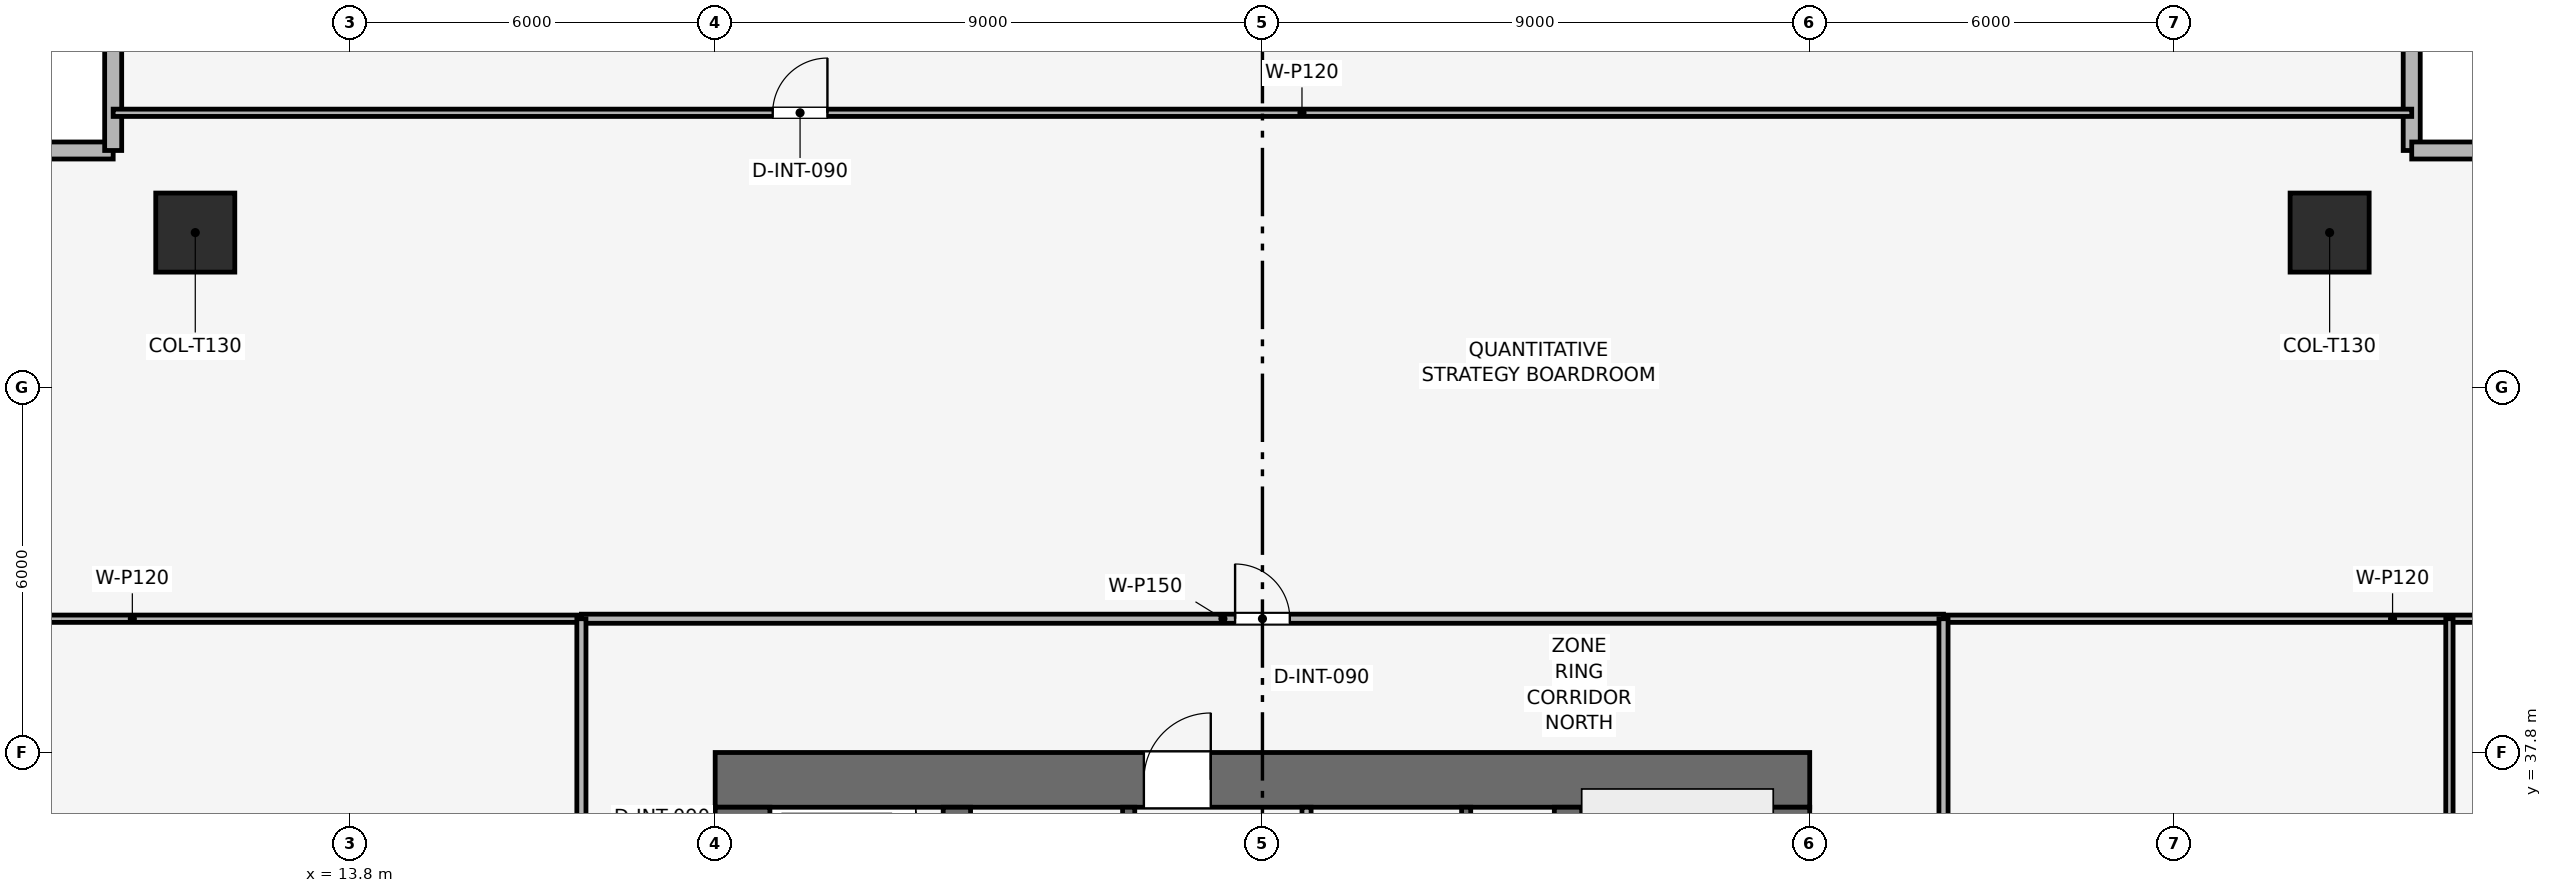
"""IFC4 building model, lengths in metres.
Left out: names, types, materials, properties, quantities, classifications, styles, units other than length and angle.
Written with IfcOpenShell. Run it as: python <this file> out.ifc"""

import sys

from ifc_helpers import new_model, si_unit, direction, frame, frame_2d, origin, origin_2d, place, context, subcontext, project, spatial, rectangle, extrude, element, fill, save


model = new_model("IFC4")
c1 = context("Model", 3, precision=1e-05, world=origin(), true_north=direction((0.0, 1.0)))
c2 = subcontext(c1, "Body", "Model", "MODEL_VIEW")
j1 = project(units=[si_unit("LENGTHUNIT", "METRE"), si_unit("PLANEANGLEUNIT", "RADIAN")], contexts=[c1])
p1 = place(None, origin())
s1 = spatial("IfcSite", under=j1, at=p1, CompositionType="ELEMENT")
p2 = place(p1, origin())
s2 = spatial("IfcBuilding", under=s1, at=p2, CompositionType="ELEMENT")
p3 = place(p2, frame((0.0, 0.0, 121.2)))
s3 = spatial("IfcBuildingStorey", under=s2, at=p3, CompositionType="ELEMENT", Elevation=121.2)
p4 = place(p3, frame((19.8, 37.35, 0.0), z_axis=(0.0, 0.0, 1.0), x_axis=(1.0, 0.0, 0.0)))
e1 = element("IfcWall", 1, at=p4, inside=s3, PredefinedType="SHEAR", context=c2, shape_type="SweptSolid", body=[
    extrude(rectangle(XDim=18.0, YDim=0.9, at=frame_2d((9.0, 0.0))), origin(), (0.0, 0.0, 1.0), 3.9),
])
p5 = place(p4, frame((7.05, 0.0, 0.0)))
e2 = element("IfcOpeningElement", 2, at=p5, cuts=e1, PredefinedType="OPENING", context=c2, shape_type="SweptSolid", body=[
    extrude(rectangle(XDim=1.1, YDim=2.15, at=frame_2d((0.55, 1.075))), frame((0.0, 0.46, 0.0), z_axis=(0.0, -1.0, 0.0), x_axis=(1.0, 0.0, 0.0)), (0.0, 0.0, 1.0), 0.92),
])
p6 = place(p3, frame((20.25, 20.7, 0.0), z_axis=(0.0, 0.0, 1.0), x_axis=(0.0, 1.0, 0.0)))
e3 = element("IfcWall", 3, at=p6, inside=s3, PredefinedType="SHEAR", context=c2, shape_type="SweptSolid", body=[
    extrude(rectangle(XDim=16.2, YDim=0.9, at=frame_2d((8.1, 0.0))), origin(), (0.0, 0.0, 1.0), 3.9),
])
p7 = place(p6, frame((10.1, 0.0, 0.0)))
e4 = element("IfcOpeningElement", 4, at=p7, cuts=e3, PredefinedType="OPENING", context=c2, shape_type="SweptSolid", body=[
    extrude(rectangle(XDim=1.1, YDim=2.15, at=frame_2d((0.55, 1.075))), frame((0.0, 0.46, 0.0), z_axis=(0.0, -1.0, 0.0), x_axis=(1.0, 0.0, 0.0)), (0.0, 0.0, 1.0), 0.92),
])
p8 = place(p3, frame((37.35, 20.7, 0.0), z_axis=(0.0, 0.0, 1.0), x_axis=(0.0, 1.0, 0.0)))
e5 = element("IfcWall", 5, at=p8, inside=s3, PredefinedType="SHEAR", context=c2, shape_type="SweptSolid", body=[
    extrude(rectangle(XDim=16.2, YDim=0.9, at=frame_2d((8.1, 0.0))), origin(), (0.0, 0.0, 1.0), 3.9),
])
p9 = place(p8, frame((4.6, 0.0, 0.0)))
e6 = element("IfcOpeningElement", 6, at=p9, cuts=e5, PredefinedType="OPENING", context=c2, shape_type="SweptSolid", body=[
    extrude(rectangle(XDim=1.1, YDim=2.15, at=frame_2d((0.55, 1.075))), frame((0.0, 0.46, 0.0), z_axis=(0.0, -1.0, 0.0), x_axis=(1.0, 0.0, 0.0)), (0.0, 0.0, 1.0), 0.92),
])
for number, where, z_axis, x_axis in (
    (7, (23.775, 20.7, 0.0), (0.0, 0.0, 1.0), (0.0, 1.0, 0.0)),
    (8, (33.825, 20.7, 0.0), (0.0, 0.0, 1.0), (0.0, 1.0, 0.0)),
):
    element("IfcWall", number, at=place(p3, frame(where, z_axis=z_axis, x_axis=x_axis)), inside=s3, PredefinedType="SHEAR", context=c2, shape_type="SweptSolid", body=[
        extrude(rectangle(XDim=16.2, YDim=0.45, at=frame_2d((8.1, 0.0))), origin(), (0.0, 0.0, 1.0), 3.9),
    ])
for number, where, z_axis, x_axis in (
    (9, (46.35, 46.35, 0.003), (0.0, 0.0, 1.0), (1.0, 0.0, 0.0)),
    (10, (11.25, 46.35, 0.003), (0.0, 0.0, 1.0), (1.0, 0.0, 0.0)),
):
    element("IfcColumn", number, at=place(p3, frame(where, z_axis=z_axis, x_axis=x_axis)), inside=s3, PredefinedType="COLUMN", context=c2, shape_type="SweptSolid", body=[
        extrude(rectangle(XDim=1.3, YDim=1.3, at=origin_2d()), origin(), (0.0, 0.0, 1.0), 3.644),
    ])
p10 = place(p3, frame((2.83, 47.7, 0.0), z_axis=(0.0, 0.0, 1.0), x_axis=(1.0, 0.0, 0.0)))
e11 = element("IfcWall", 11, at=p10, inside=s3, PredefinedType="SOLIDWALL", context=c2, shape_type="SweptSolid", body=[
    extrude(rectangle(XDim=7.07, YDim=0.28, at=frame_2d((3.535, 0.0))), origin(), (0.0, 0.0, 1.0), 3.65),
])
p11 = place(p10, frame((2.285, 0.0, 0.9)))
e12 = element("IfcOpeningElement", 12, at=p11, cuts=e11, PredefinedType="OPENING", context=c2, shape_type="SweptSolid", body=[
    extrude(rectangle(XDim=2.5, YDim=1.9, at=frame_2d((1.25, 0.95))), frame((0.0, 0.15, 0.0), z_axis=(0.0, -1.0, 0.0), x_axis=(1.0, 0.0, 0.0)), (0.0, 0.0, 1.0), 0.3),
])
p12 = place(p3, frame((9.9, 47.7, 0.0), z_axis=(0.0, 0.0, 1.0), x_axis=(0.0, 1.0, 0.0)))
e13 = element("IfcWall", 13, at=p12, inside=s3, PredefinedType="SOLIDWALL", context=c2, shape_type="SweptSolid", body=[
    extrude(rectangle(XDim=7.07, YDim=0.28, at=frame_2d((3.535, 0.0))), origin(), (0.0, 0.0, 1.0), 3.65),
])
p13 = place(p12, frame((2.285, 0.0, 0.9)))
e14 = element("IfcOpeningElement", 14, at=p13, cuts=e13, PredefinedType="OPENING", context=c2, shape_type="SweptSolid", body=[
    extrude(rectangle(XDim=2.5, YDim=1.9, at=frame_2d((1.25, 0.95))), frame((0.0, 0.15, 0.0), z_axis=(0.0, -1.0, 0.0), x_axis=(1.0, 0.0, 0.0)), (0.0, 0.0, 1.0), 0.3),
])
p14 = place(p3, frame((47.7, 54.77, 0.0), z_axis=(0.0, 0.0, 1.0), x_axis=(0.0, -1.0, 0.0)))
e15 = element("IfcWall", 15, at=p14, inside=s3, PredefinedType="SOLIDWALL", context=c2, shape_type="SweptSolid", body=[
    extrude(rectangle(XDim=7.07, YDim=0.28, at=frame_2d((3.535, 0.0))), origin(), (0.0, 0.0, 1.0), 3.65),
])
p15 = place(p14, frame((2.285, 0.0, 0.9)))
e16 = element("IfcOpeningElement", 16, at=p15, cuts=e15, PredefinedType="OPENING", context=c2, shape_type="SweptSolid", body=[
    extrude(rectangle(XDim=2.5, YDim=1.9, at=frame_2d((1.25, 0.95))), frame((0.0, 0.15, 0.0), z_axis=(0.0, -1.0, 0.0), x_axis=(1.0, 0.0, 0.0)), (0.0, 0.0, 1.0), 0.3),
])
p16 = place(p3, frame((47.7, 47.7, 0.0), z_axis=(0.0, 0.0, 1.0), x_axis=(1.0, 0.0, 0.0)))
e17 = element("IfcWall", 17, at=p16, inside=s3, PredefinedType="SOLIDWALL", context=c2, shape_type="SweptSolid", body=[
    extrude(rectangle(XDim=7.07, YDim=0.28, at=frame_2d((3.535, 0.0))), origin(), (0.0, 0.0, 1.0), 3.65),
])
p17 = place(p16, frame((2.285, 0.0, 0.9)))
e18 = element("IfcOpeningElement", 18, at=p17, cuts=e17, PredefinedType="OPENING", context=c2, shape_type="SweptSolid", body=[
    extrude(rectangle(XDim=2.5, YDim=1.9, at=frame_2d((1.25, 0.95))), frame((0.0, 0.15, 0.0), z_axis=(0.0, -1.0, 0.0), x_axis=(1.0, 0.0, 0.0)), (0.0, 0.0, 1.0), 0.3),
])
p18 = place(p3, frame((32.15, 34.0, 0.0), z_axis=(0.0, 0.0, 1.0), x_axis=(0.0, 1.0, 0.0)))
e19 = element("IfcWall", 19, at=p18, inside=s3, PredefinedType="SHEAR", context=c2, shape_type="SweptSolid", body=[
    extrude(rectangle(XDim=2.9, YDim=0.15, at=frame_2d((1.45, 0.0))), origin(), (0.0, 0.0, 1.0), 3.65),
])
p19 = place(p3, frame((26.6, 34.0, 0.0), z_axis=(0.0, 0.0, 1.0), x_axis=(0.0, 1.0, 0.0)))
e20 = element("IfcWall", 20, at=p19, inside=s3, PredefinedType="SHEAR", context=c2, shape_type="SweptSolid", body=[
    extrude(rectangle(XDim=2.9, YDim=0.2, at=frame_2d((1.45, 0.0))), origin(), (0.0, 0.0, 1.0), 3.65),
])
p20 = place(p19, frame((0.75, 0.0, 0.0)))
e21 = element("IfcOpeningElement", 21, at=p20, cuts=e20, PredefinedType="OPENING", context=c2, shape_type="SweptSolid", body=[
    extrude(rectangle(XDim=1.1, YDim=2.15, at=frame_2d((0.55, 1.075))), frame((0.0, 0.11, 0.0), z_axis=(0.0, -1.0, 0.0), x_axis=(1.0, 0.0, 0.0)), (0.0, 0.0, 1.0), 0.22),
])
p21 = place(p3, frame((29.525, 33.925, 0.0), z_axis=(0.0, 0.0, 1.0), x_axis=(0.0, 1.0, 0.0)))
e22 = element("IfcWall", 22, at=p21, inside=s3, PredefinedType="PARTITIONING", context=c2, shape_type="SweptSolid", body=[
    extrude(rectangle(XDim=2.975, YDim=0.15, at=frame_2d((1.487, 0.0))), origin(), (0.0, 0.0, 1.0), 3.65),
])
p22 = place(p21, frame((0.85, 0.0, 0.0)))
e23 = element("IfcOpeningElement", 23, at=p22, cuts=e22, PredefinedType="OPENING", context=c2, shape_type="SweptSolid", body=[
    extrude(rectangle(XDim=0.9, YDim=2.1, at=frame_2d((0.45, 1.05))), frame((0.0, 0.085, 0.0), z_axis=(0.0, -1.0, 0.0), x_axis=(1.0, 0.0, 0.0)), (0.0, 0.0, 1.0), 0.17),
])
p23 = place(p3, frame((9.9, 48.32, 0.0), z_axis=(0.0, 0.0, 1.0), x_axis=(1.0, 0.0, 0.0)))
e24 = element("IfcWall", 24, at=p23, inside=s3, PredefinedType="PARTITIONING", context=c2, shape_type="SweptSolid", body=[
    extrude(rectangle(XDim=37.8, YDim=0.12, at=frame_2d((18.9, 0.0))), origin(), (0.0, 0.0, 1.0), 3.035),
])
p24 = place(p23, frame((10.846, 0.0, 0.0)))
e25 = element("IfcOpeningElement", 25, at=p24, cuts=e24, PredefinedType="OPENING", context=c2, shape_type="SweptSolid", body=[
    extrude(rectangle(XDim=0.9, YDim=2.1, at=frame_2d((0.45, 1.05))), frame((0.0, 0.07, 0.0), z_axis=(0.0, -1.0, 0.0), x_axis=(1.0, 0.0, 0.0)), (0.0, 0.0, 1.0), 0.14),
])
for number, where, z_axis, x_axis in (
    (26, (2.83, 40.0, 0.0), (0.0, 0.0, 1.0), (1.0, 0.0, 0.0)),
    (27, (40.0, 40.0, 0.0), (0.0, 0.0, 1.0), (1.0, 0.0, 0.0)),
):
    element("IfcWall", number, at=place(p3, frame(where, z_axis=z_axis, x_axis=x_axis)), inside=s3, PredefinedType="PARTITIONING", context=c2, shape_type="SweptSolid", body=[
        extrude(rectangle(XDim=14.77, YDim=0.12, at=frame_2d((7.385, 0.0))), origin(), (0.0, 0.0, 1.0), 3.035),
    ])
p25 = place(p3, frame((48.32, 28.956, 0.0), z_axis=(0.0, 0.0, 1.0), x_axis=(0.0, 1.0, 0.0)))
e28 = element("IfcWall", 28, at=p25, inside=s3, PredefinedType="PARTITIONING", context=c2, shape_type="SweptSolid", body=[
    extrude(rectangle(XDim=11.044, YDim=0.12, at=frame_2d((5.522, 0.0))), origin(), (0.0, 0.0, 1.0), 3.185),
])
p26 = place(p25, frame((6.29, 0.0, 0.0)))
e29 = element("IfcOpeningElement", 29, at=p26, cuts=e28, PredefinedType="OPENING", context=c2, shape_type="SweptSolid", body=[
    extrude(rectangle(XDim=0.9, YDim=2.1, at=frame_2d((0.45, 1.05))), frame((0.0, 0.07, 0.0), z_axis=(0.0, -1.0, 0.0), x_axis=(1.0, 0.0, 0.0)), (0.0, 0.0, 1.0), 0.14),
])
p27 = place(p3, frame((17.6, 40.0, 0.0), z_axis=(0.0, 0.0, 1.0), x_axis=(1.0, 0.0, 0.0)))
e30 = element("IfcWall", 30, at=p27, inside=s3, PredefinedType="PARTITIONING", context=c2, shape_type="SweptSolid", body=[
    extrude(rectangle(XDim=22.4, YDim=0.15, at=frame_2d((11.2, 0.0))), origin(), (0.0, 0.0, 1.0), 3.185),
])
p28 = place(p27, frame((10.75, 0.0, 0.0)))
e31 = element("IfcOpeningElement", 31, at=p28, cuts=e30, PredefinedType="OPENING", context=c2, shape_type="SweptSolid", body=[
    extrude(rectangle(XDim=0.9, YDim=2.1, at=frame_2d((0.45, 1.05))), frame((0.0, 0.085, 0.0), z_axis=(0.0, -1.0, 0.0), x_axis=(1.0, 0.0, 0.0)), (0.0, 0.0, 1.0), 0.17),
])
p29 = place(p3, frame((17.6, 17.6, 0.0), z_axis=(0.0, 0.0, 1.0), x_axis=(0.0, 1.0, 0.0)))
e32 = element("IfcWall", 32, at=p29, inside=s3, PredefinedType="PARTITIONING", context=c2, shape_type="SweptSolid", body=[
    extrude(rectangle(XDim=22.4, YDim=0.15, at=frame_2d((11.2, 0.0))), origin(), (0.0, 0.0, 1.0), 3.185),
])
p30 = place(p29, frame((1.95, 0.0, 0.0)))
e33 = element("IfcOpeningElement", 33, at=p30, cuts=e32, PredefinedType="OPENING", context=c2, shape_type="SweptSolid", body=[
    extrude(rectangle(XDim=0.9, YDim=2.1, at=frame_2d((0.45, 1.05))), frame((0.0, 0.085, 0.0), z_axis=(0.0, -1.0, 0.0), x_axis=(1.0, 0.0, 0.0)), (0.0, 0.0, 1.0), 0.17),
])
p31 = place(p29, frame((5.75, 0.0, 0.0)))
e34 = element("IfcOpeningElement", 34, at=p31, cuts=e32, PredefinedType="OPENING", context=c2, shape_type="SweptSolid", body=[
    extrude(rectangle(XDim=0.9, YDim=2.1, at=frame_2d((0.45, 1.05))), frame((0.0, 0.085, 0.0), z_axis=(0.0, -1.0, 0.0), x_axis=(1.0, 0.0, 0.0)), (0.0, 0.0, 1.0), 0.17),
])
p32 = place(p29, frame((8.65, 0.0, 0.0)))
e35 = element("IfcOpeningElement", 35, at=p32, cuts=e32, PredefinedType="OPENING", context=c2, shape_type="SweptSolid", body=[
    extrude(rectangle(XDim=0.9, YDim=2.1, at=frame_2d((0.45, 1.05))), frame((0.0, 0.085, 0.0), z_axis=(0.0, -1.0, 0.0), x_axis=(1.0, 0.0, 0.0)), (0.0, 0.0, 1.0), 0.17),
])
p33 = place(p29, frame((11.4, 0.0, 0.0)))
e36 = element("IfcOpeningElement", 36, at=p33, cuts=e32, PredefinedType="OPENING", context=c2, shape_type="SweptSolid", body=[
    extrude(rectangle(XDim=0.95, YDim=2.1, at=frame_2d((0.475, 1.05))), frame((0.0, 0.085, 0.0), z_axis=(0.0, -1.0, 0.0), x_axis=(1.0, 0.0, 0.0)), (0.0, 0.0, 1.0), 0.17),
])
p34 = place(p29, frame((17.35, 0.0, 0.0)))
e37 = element("IfcOpeningElement", 37, at=p34, cuts=e32, PredefinedType="OPENING", context=c2, shape_type="SweptSolid", body=[
    extrude(rectangle(XDim=0.9, YDim=2.1, at=frame_2d((0.45, 1.05))), frame((0.0, 0.085, 0.0), z_axis=(0.0, -1.0, 0.0), x_axis=(1.0, 0.0, 0.0)), (0.0, 0.0, 1.0), 0.17),
])
p35 = place(p3, frame((40.0, 17.6, 0.0), z_axis=(0.0, 0.0, 1.0), x_axis=(0.0, 1.0, 0.0)))
e38 = element("IfcWall", 38, at=p35, inside=s3, PredefinedType="PARTITIONING", context=c2, shape_type="SweptSolid", body=[
    extrude(rectangle(XDim=22.4, YDim=0.15, at=frame_2d((11.2, 0.0))), origin(), (0.0, 0.0, 1.0), 3.185),
])
p36 = place(p35, frame((0.7, 0.0, 0.0)))
e39 = element("IfcOpeningElement", 39, at=p36, cuts=e38, PredefinedType="OPENING", context=c2, shape_type="SweptSolid", body=[
    extrude(rectangle(XDim=0.9, YDim=2.1, at=frame_2d((0.45, 1.05))), frame((0.0, 0.085, 0.0), z_axis=(0.0, -1.0, 0.0), x_axis=(1.0, 0.0, 0.0)), (0.0, 0.0, 1.0), 0.17),
])
p37 = place(p35, frame((6.378, 0.0, 0.0)))
e40 = element("IfcOpeningElement", 40, at=p37, cuts=e38, PredefinedType="OPENING", context=c2, shape_type="SweptSolid", body=[
    extrude(rectangle(XDim=0.9, YDim=2.1, at=frame_2d((0.45, 1.05))), frame((0.0, 0.085, 0.0), z_axis=(0.0, -1.0, 0.0), x_axis=(1.0, 0.0, 0.0)), (0.0, 0.0, 1.0), 0.17),
])
p38 = place(p35, frame((16.428, 0.0, 0.0)))
e41 = element("IfcOpeningElement", 41, at=p38, cuts=e38, PredefinedType="OPENING", context=c2, shape_type="SweptSolid", body=[
    extrude(rectangle(XDim=0.9, YDim=2.1, at=frame_2d((0.45, 1.05))), frame((0.0, 0.085, 0.0), z_axis=(0.0, -1.0, 0.0), x_axis=(1.0, 0.0, 0.0)), (0.0, 0.0, 1.0), 0.17),
])
p39 = place(p24, origin())
e42 = element("IfcDoor", 42, at=p39, inside=s3, OperationType="SINGLE_SWING_RIGHT", PredefinedType="DOOR", context=c2, shape_type="SweptSolid", body=[
    extrude(rectangle(XDim=0.9, YDim=2.1, at=frame_2d((0.45, 1.05))), frame((0.0, 0.025, 0.0), z_axis=(0.0, -1.0, 0.0), x_axis=(1.0, 0.0, 0.0)), (0.0, 0.0, 1.0), 0.05),
])
fill(e25, e42)
p40 = place(p28, origin())
e43 = element("IfcDoor", 43, at=p40, inside=s3, OperationType="SINGLE_SWING_LEFT", PredefinedType="DOOR", context=c2, shape_type="SweptSolid", body=[
    extrude(rectangle(XDim=0.9, YDim=2.1, at=frame_2d((0.45, 1.05))), frame((0.0, 0.025, 0.0), z_axis=(0.0, -1.0, 0.0), x_axis=(1.0, 0.0, 0.0)), (0.0, 0.0, 1.0), 0.05),
])
fill(e31, e43)
p41 = place(p5, origin())
e44 = element("IfcDoor", 44, at=p41, inside=s3, OperationType="SINGLE_SWING_RIGHT", PredefinedType="DOOR", context=c2, shape_type="SweptSolid", body=[
    extrude(rectangle(XDim=1.1, YDim=2.15, at=frame_2d((0.55, 1.075))), frame((0.0, 0.025, 0.0), z_axis=(0.0, -1.0, 0.0), x_axis=(1.0, 0.0, 0.0)), (0.0, 0.0, 1.0), 0.05),
])
fill(e2, e44)
save(model, sys.argv[1])
